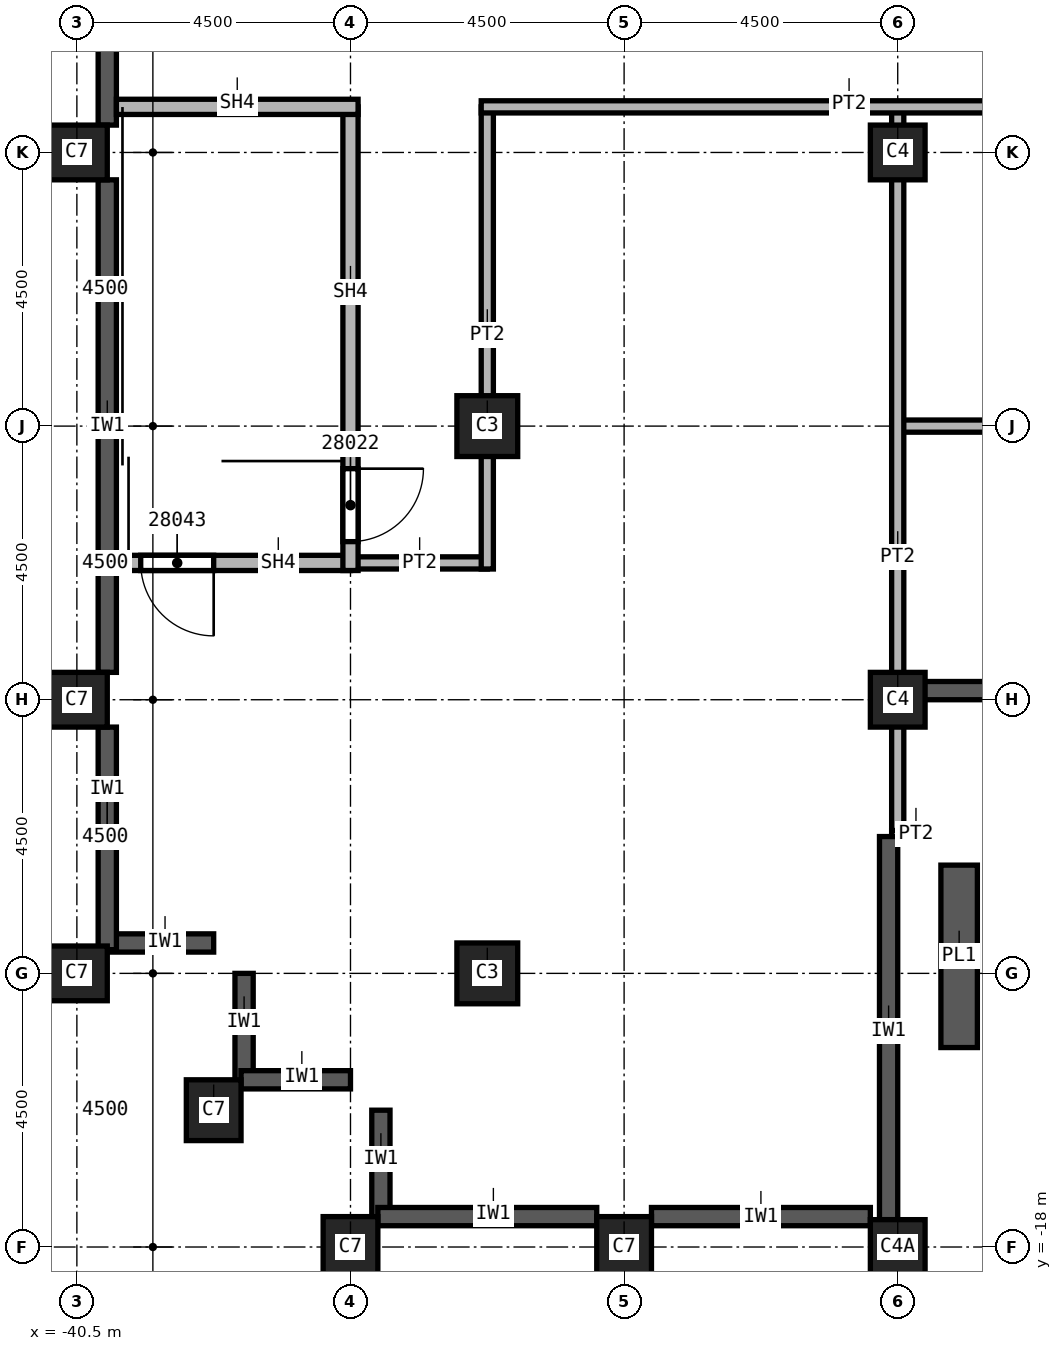
"""IFC4 building model, lengths in metres.
Left out: names, types, materials, properties, quantities, classifications, styles, units other than length and angle.
Written with IfcOpenShell. Run it as: python <this file> out.ifc"""

import sys

from ifc_helpers import new_model, si_unit, direction, frame, frame_2d, origin, origin_2d, place, context, subcontext, project, spatial, rectangle, extrude, element, fill, save


model = new_model("IFC4")
c1 = context("Model", 3, precision=1e-05, world=origin(), true_north=direction((0.0, 1.0)))
c2 = subcontext(c1, "Body", "Model", "MODEL_VIEW")
j1 = project(units=[si_unit("LENGTHUNIT", "METRE"), si_unit("PLANEANGLEUNIT", "RADIAN")], contexts=[c1])
p1 = place(None, origin())
s1 = spatial("IfcSite", under=j1, at=p1, CompositionType="ELEMENT")
p2 = place(p1, origin())
s2 = spatial("IfcBuilding", under=s1, at=p2, CompositionType="ELEMENT")
p3 = place(p2, frame((0.0, 0.0, 236.0)))
s3 = spatial("IfcBuildingStorey", under=s2, at=p3, CompositionType="ELEMENT", Elevation=236.0)
for number, where, z_axis, x_axis in (
    (1, (-40.5, 0.0, 0.0), (0.0, 0.0, 1.0), (0.0, 1.0, 0.0)),
    (2, (-40.5, -9.0, 0.0), (0.0, 0.0, 1.0), (0.0, 1.0, 0.0)),
    (3, (-40.5, -13.5, 0.0), (0.0, 0.0, 1.0), (0.0, 1.0, 0.0)),
    (4, (-38.25, -15.75, 0.0), (0.0, 0.0, 1.0), (1.0, 0.0, 0.0)),
    (5, (-31.5, -18.0, 0.0), (0.0, 0.0, 1.0), (1.0, 0.0, 0.0)),
    (6, (-36.0, -18.0, 0.0), (0.0, 0.0, 1.0), (1.0, 0.0, 0.0)),
):
    element("IfcColumn", number, at=place(p3, frame(where, z_axis=z_axis, x_axis=x_axis)), inside=s3, PredefinedType="COLUMN", context=c2, shape_type="SweptSolid", body=[
        extrude(rectangle(XDim=0.9, YDim=1.0, at=origin_2d()), origin(), (0.0, 0.0, 1.0), 5.72),
    ])
for number, where, z_axis, x_axis in (
    (7, (-33.75, -4.5, 0.0), (0.0, 0.0, 1.0), (1.0, 0.0, 0.0)),
    (8, (-33.75, -13.5, 0.0), (0.0, 0.0, 1.0), (1.0, 0.0, 0.0)),
):
    element("IfcColumn", number, at=place(p3, frame(where, z_axis=z_axis, x_axis=x_axis)), inside=s3, PredefinedType="COLUMN", context=c2, shape_type="SweptSolid", body=[
        extrude(rectangle(XDim=1.0, YDim=1.0, at=origin_2d()), origin(), (0.0, 0.0, 1.0), 5.72),
    ])
for number, where, z_axis, x_axis in (
    (9, (-27.0, 0.0, 0.0), (0.0, 0.0, 1.0), (1.0, 0.0, 0.0)),
    (10, (-27.0, -9.0, 0.0), (0.0, 0.0, 1.0), (1.0, 0.0, 0.0)),
):
    element("IfcColumn", number, at=place(p3, frame(where, z_axis=z_axis, x_axis=x_axis)), inside=s3, PredefinedType="COLUMN", context=c2, shape_type="SweptSolid", body=[
        extrude(rectangle(XDim=0.9, YDim=0.9, at=origin_2d()), origin(), (0.0, 0.0, 1.0), 5.72),
    ])
p4 = place(p3, frame((-27.0, -18.0, 0.0), z_axis=(0.0, 0.0, 1.0), x_axis=(1.0, 0.0, 0.0)))
e11 = element("IfcColumn", 11, at=p4, inside=s3, PredefinedType="COLUMN", context=c2, shape_type="SweptSolid", body=[
    extrude(rectangle(XDim=0.9, YDim=0.9, at=origin_2d()), origin(), (0.0, 0.0, 1.0), 6.0),
])
p5 = place(p3, frame((-40.0, -13.0, 0.0), z_axis=(0.0, 0.0, 1.0), x_axis=(1.0, 0.0, 0.0)))
e12 = element("IfcWall", 12, at=p5, inside=s3, PredefinedType="SOLIDWALL", context=c2, shape_type="SweptSolid", body=[
    extrude(rectangle(XDim=1.75, YDim=0.3, at=frame_2d((0.875, 0.0))), origin(), (0.0, 0.0, 1.0), 5.12),
])
for number, where, z_axis, x_axis in (
    (13, (-37.75, -15.3, 0.0), (0.0, 0.0, 1.0), (0.0, 1.0, 0.0)),
    (14, (-37.8, -15.25, 0.0), (0.0, 0.0, 1.0), (1.0, 0.0, 0.0)),
    (15, (-35.5, -17.55, 0.0), (0.0, 0.0, 1.0), (0.0, 1.0, 0.0)),
):
    element("IfcWall", number, at=place(p3, frame(where, z_axis=z_axis, x_axis=x_axis)), inside=s3, PredefinedType="SOLIDWALL", context=c2, shape_type="SweptSolid", body=[
        extrude(rectangle(XDim=1.8, YDim=0.3, at=frame_2d((0.9, 0.0))), origin(), (0.0, 0.0, 1.0), 5.12),
    ])
for number, where, z_axis, x_axis in (
    (16, (-40.0, 8.55, 0.0), (0.0, 0.0, 1.0), (0.0, -1.0, 0.0)),
    (17, (-40.0, -0.45, 0.0), (0.0, 0.0, 1.0), (0.0, -1.0, 0.0)),
):
    element("IfcWall", number, at=place(p3, frame(where, z_axis=z_axis, x_axis=x_axis)), inside=s3, PredefinedType="SOLIDWALL", context=c2, shape_type="SweptSolid", body=[
        extrude(rectangle(XDim=8.1, YDim=0.3, at=frame_2d((4.05, 0.0))), origin(), (0.0, 0.0, 1.0), 5.12),
    ])
p6 = place(p3, frame((-40.0, -9.45, 0.0), z_axis=(0.0, 0.0, 1.0), x_axis=(0.0, -1.0, 0.0)))
e18 = element("IfcWall", 18, at=p6, inside=s3, PredefinedType="SOLIDWALL", context=c2, shape_type="SweptSolid", body=[
    extrude(rectangle(XDim=3.66, YDim=0.3, at=frame_2d((1.83, 0.0))), origin(), (0.0, 0.0, 1.0), 5.12),
])
for number, where, z_axis, x_axis in (
    (19, (-35.55, -17.5, 0.0), (0.0, 0.0, 1.0), (1.0, 0.0, 0.0)),
    (20, (-31.05, -17.5, 0.0), (0.0, 0.0, 1.0), (1.0, 0.0, 0.0)),
):
    element("IfcWall", number, at=place(p3, frame(where, z_axis=z_axis, x_axis=x_axis)), inside=s3, PredefinedType="SOLIDWALL", context=c2, shape_type="SweptSolid", body=[
        extrude(rectangle(XDim=3.6, YDim=0.3, at=frame_2d((1.8, 0.0))), origin(), (0.0, 0.0, 1.0), 5.12),
    ])
p7 = place(p3, frame((-26.95, -8.85, 0.0), z_axis=(0.0, 0.0, 1.0), x_axis=(1.0, 0.0, 0.0)))
e21 = element("IfcWall", 21, at=p7, inside=s3, PredefinedType="SOLIDWALL", context=c2, shape_type="SweptSolid", body=[
    extrude(rectangle(XDim=3.95, YDim=0.3, at=frame_2d((1.975, 0.0))), origin(), (0.0, 0.0, 1.0), 5.12),
])
p8 = place(p3, frame((-25.99, -14.72, 0.0), z_axis=(0.0, 0.0, 1.0), x_axis=(0.0, 1.0, 0.0)))
e22 = element("IfcWall", 22, at=p8, inside=s3, PredefinedType="SOLIDWALL", context=c2, shape_type="SweptSolid", body=[
    extrude(rectangle(XDim=3.0, YDim=0.6, at=frame_2d((1.5, 0.0))), origin(), (0.0, 0.0, 1.0), 0.54),
])
p9 = place(p3, frame((-33.75, -6.75, 0.0), z_axis=(0.0, 0.0, 1.0), x_axis=(-1.0, 0.0, 0.0)))
e23 = element("IfcWall", 23, at=p9, inside=s3, PredefinedType="PARTITIONING", context=c2, shape_type="SweptSolid", body=[
    extrude(rectangle(XDim=2.25, YDim=0.2, at=frame_2d((1.125, 0.0))), origin(), (0.0, 0.0, 1.0), 5.72),
])
p10 = place(p3, frame((-33.75, 0.75, 0.0), z_axis=(0.0, 0.0, 1.0), x_axis=(0.0, -1.0, 0.0)))
e24 = element("IfcWall", 24, at=p10, inside=s3, PredefinedType="PARTITIONING", context=c2, shape_type="SweptSolid", body=[
    extrude(rectangle(XDim=7.6, YDim=0.2, at=frame_2d((3.8, 0.0))), origin(), (0.0, 0.0, 1.0), 5.72),
])
p11 = place(p3, frame((-27.1, -4.5, 0.0), z_axis=(0.0, 0.0, 1.0), x_axis=(1.0, 0.0, 0.0)))
e25 = element("IfcWall", 25, at=p11, inside=s3, PredefinedType="PARTITIONING", context=c2, shape_type="SweptSolid", body=[
    extrude(rectangle(XDim=7.2, YDim=0.2, at=frame_2d((3.6, 0.0))), origin(), (0.0, 0.0, 1.0), 5.72),
])
p12 = place(p3, frame((-27.0, -11.25, 0.0), z_axis=(0.0, 0.0, 1.0), x_axis=(0.0, 1.0, 0.0)))
e26 = element("IfcWall", 26, at=p12, inside=s3, PredefinedType="PARTITIONING", context=c2, shape_type="SweptSolid", body=[
    extrude(rectangle(XDim=12.0, YDim=0.2, at=frame_2d((6.0, 0.0))), origin(), (0.0, 0.0, 1.0), 5.72),
])
p13 = place(p3, frame((-19.9, 0.75, 0.0), z_axis=(0.0, 0.0, 1.0), x_axis=(-1.0, 0.0, 0.0)))
e27 = element("IfcWall", 27, at=p13, inside=s3, PredefinedType="PARTITIONING", context=c2, shape_type="SweptSolid", body=[
    extrude(rectangle(XDim=13.95, YDim=0.2, at=frame_2d((6.975, 0.0))), origin(), (0.0, 0.0, 1.0), 5.72),
])
p14 = place(p13, frame((0.85, 0.0, 0.0)))
e28 = element("IfcOpeningElement", 28, at=p14, cuts=e27, PredefinedType="OPENING", context=c2, shape_type="SweptSolid", body=[
    extrude(rectangle(XDim=1.0, YDim=2.1, at=frame_2d((0.5, 1.05))), frame((0.0, 0.1, 0.0), z_axis=(0.0, -1.0, 0.0), x_axis=(1.0, 0.0, 0.0)), (0.0, 0.0, 1.0), 0.2),
])
p15 = place(p3, frame((-26.5, -11.25, 0.0), z_axis=(0.0, 0.0, 1.0), x_axis=(-1.0, 0.0, 0.0)))
e29 = element("IfcWall", 29, at=p15, inside=s3, PredefinedType="PARTITIONING", context=c2, shape_type="SweptSolid", body=[
    extrude(rectangle(XDim=0.6, YDim=0.2, at=frame_2d((0.3, 0.0))), origin(), (0.0, 0.0, 1.0), 5.72),
])
p16 = place(p3, frame((-36.0, -6.75, 0.0), z_axis=(0.0, 0.0, 1.0), x_axis=(-1.0, 0.0, 0.0)))
e30 = element("IfcWall", 30, at=p16, inside=s3, PredefinedType="SOLIDWALL", context=c2, shape_type="SweptSolid", body=[
    extrude(rectangle(XDim=3.85, YDim=0.25, at=frame_2d((1.925, 0.0))), origin(), (0.0, 0.0, 1.0), 5.72),
])
p17 = place(p16, frame((2.25, 0.0, 0.0)))
e31 = element("IfcOpeningElement", 31, at=p17, cuts=e30, PredefinedType="OPENING", context=c2, shape_type="SweptSolid", body=[
    extrude(rectangle(XDim=1.2, YDim=2.1, at=frame_2d((0.6, 1.05))), frame((0.0, 0.125, 0.0), z_axis=(0.0, -1.0, 0.0), x_axis=(1.0, 0.0, 0.0)), (0.0, 0.0, 1.0), 0.25),
])
p18 = place(p3, frame((-36.0, 0.75, 0.0), z_axis=(0.0, 0.0, 1.0), x_axis=(0.0, -1.0, 0.0)))
e32 = element("IfcWall", 32, at=p18, inside=s3, PredefinedType="SOLIDWALL", context=c2, shape_type="SweptSolid", body=[
    extrude(rectangle(XDim=7.625, YDim=0.25, at=frame_2d((3.812, 0.0))), origin(), (0.0, 0.0, 1.0), 5.72),
])
p19 = place(p18, frame((5.95, 0.0, 0.0)))
e33 = element("IfcOpeningElement", 33, at=p19, cuts=e32, PredefinedType="OPENING", context=c2, shape_type="SweptSolid", body=[
    extrude(rectangle(XDim=1.2, YDim=2.1, at=frame_2d((0.6, 1.05))), frame((0.0, 0.125, 0.0), z_axis=(0.0, -1.0, 0.0), x_axis=(1.0, 0.0, 0.0)), (0.0, 0.0, 1.0), 0.25),
])
p20 = place(p3, frame((-35.875, 0.75, 0.0), z_axis=(0.0, 0.0, 1.0), x_axis=(-1.0, 0.0, 0.0)))
e34 = element("IfcWall", 34, at=p20, inside=s3, PredefinedType="SOLIDWALL", context=c2, shape_type="SweptSolid", body=[
    extrude(rectangle(XDim=3.975, YDim=0.25, at=frame_2d((1.988, 0.0))), origin(), (0.0, 0.0, 1.0), 5.72),
])
p21 = place(p3, frame((-27.15, -17.55, 0.0), z_axis=(0.0, 0.0, 1.0), x_axis=(0.0, 1.0, 0.0)))
e35 = element("IfcWall", 35, at=p21, inside=s3, PredefinedType="SOLIDWALL", context=c2, shape_type="SweptSolid", body=[
    extrude(rectangle(XDim=6.3, YDim=0.3, at=frame_2d((3.15, 0.0))), origin(), (0.0, 0.0, 1.0), 5.12),
])
p22 = place(p19, origin())
e36 = element("IfcDoor", 36, at=p22, inside=s3, OperationType="SINGLE_SWING_LEFT", PredefinedType="DOOR", context=c2, shape_type="SweptSolid", body=[
    extrude(rectangle(XDim=1.2, YDim=2.1, at=frame_2d((0.6, 1.05))), frame((0.0, 0.025, 0.0), z_axis=(0.0, -1.0, 0.0), x_axis=(1.0, 0.0, 0.0)), (0.0, 0.0, 1.0), 0.05),
])
fill(e33, e36)
p23 = place(p17, origin())
e37 = element("IfcDoor", 37, at=p23, inside=s3, OperationType="SINGLE_SWING_RIGHT", PredefinedType="DOOR", context=c2, shape_type="SweptSolid", body=[
    extrude(rectangle(XDim=1.2, YDim=2.1, at=frame_2d((0.6, 1.05))), frame((0.0, 0.025, 0.0), z_axis=(0.0, -1.0, 0.0), x_axis=(1.0, 0.0, 0.0)), (0.0, 0.0, 1.0), 0.05),
])
fill(e31, e37)
save(model, sys.argv[1])
